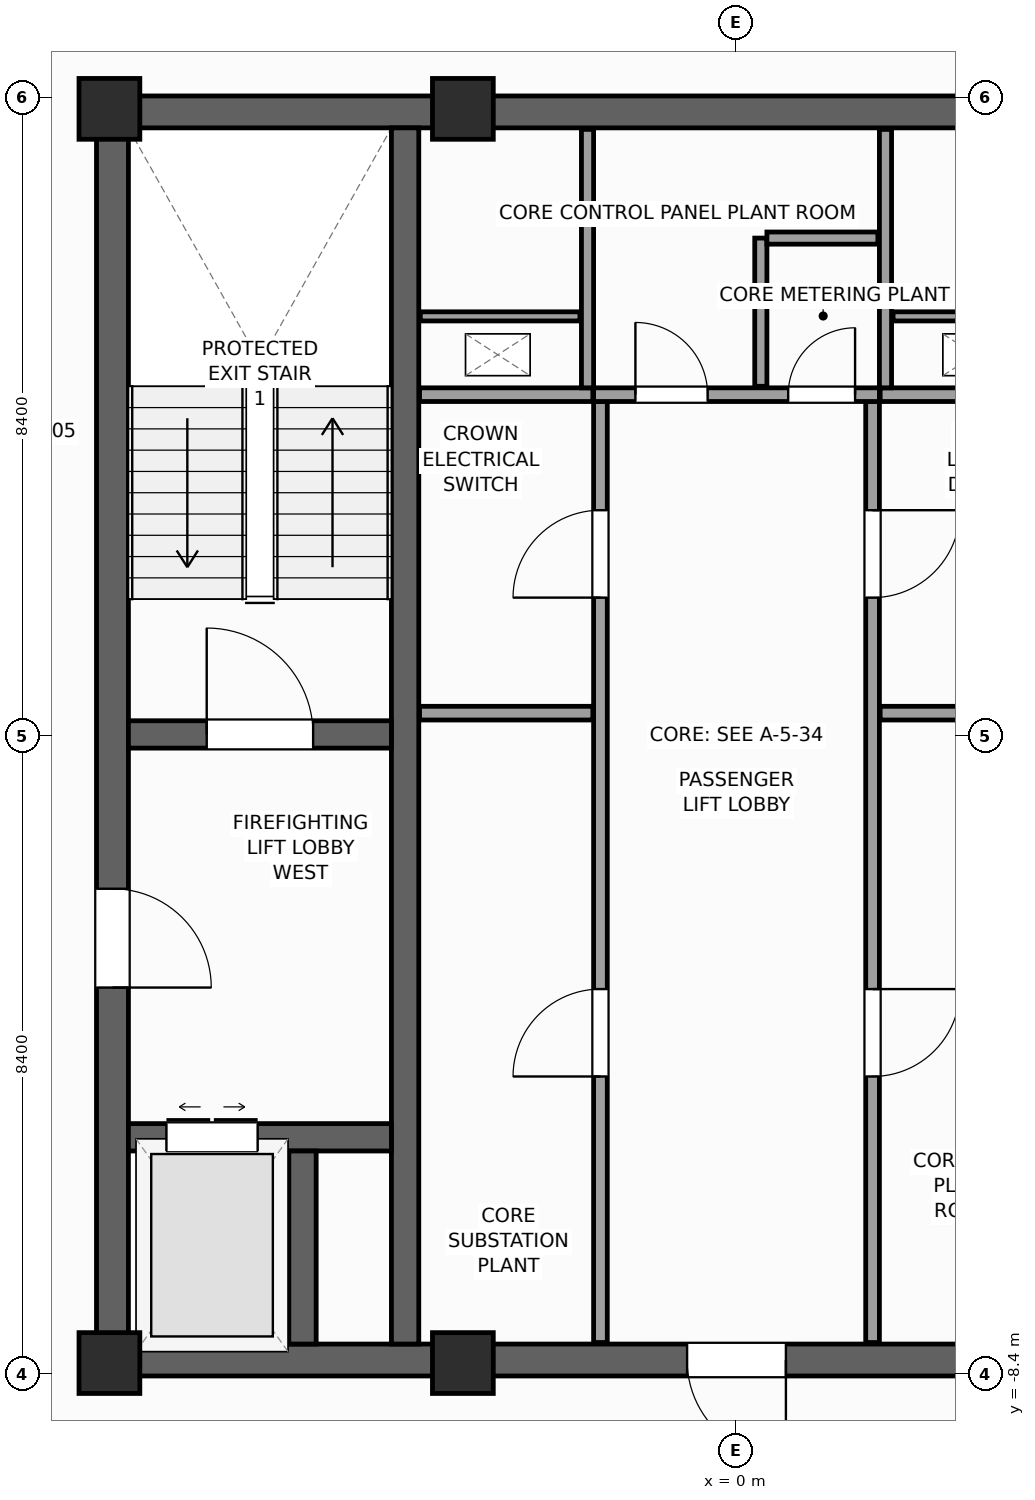
"""IFC4 building model, lengths in metres.
Left out: names, types, materials, properties, quantities, classifications, styles, units other than length and angle.
Written with IfcOpenShell. Run it as: python <this file> out.ifc"""

import sys

from ifc_helpers import new_model, si_unit, direction, frame, frame_2d, origin, origin_2d, place, context, subcontext, project, spatial, rectangle, extrude, source, transform, mapped, element, fill, save


model = new_model("IFC4")
c1 = context("Model", 3, precision=1e-05, world=origin(), true_north=direction((0.0, 1.0)))
c2 = subcontext(c1, "Body", "Model", "MODEL_VIEW")
j1 = project(units=[si_unit("LENGTHUNIT", "METRE"), si_unit("PLANEANGLEUNIT", "RADIAN")], contexts=[c1])
p1 = place(None, origin())
s1 = spatial("IfcSite", under=j1, at=p1, CompositionType="ELEMENT")
p2 = place(p1, origin())
s2 = spatial("IfcBuilding", under=s1, at=p2, CompositionType="ELEMENT")
p3 = place(p2, frame((0.0, 0.0, 329.6)))
s3 = spatial("IfcBuildingStorey", under=s2, at=p3, CompositionType="ELEMENT", Elevation=329.6)
p4 = place(p3, frame((-8.42, -8.21, 0.0), z_axis=(0.0, 0.0, 1.0), x_axis=(1.0, 0.0, 0.0)))
e1 = element("IfcWall", 1, at=p4, inside=s3, PredefinedType="SHEAR", context=c2, shape_type="SweptSolid", body=[
    extrude(rectangle(XDim=16.84, YDim=0.42, at=frame_2d((8.42, 0.0))), origin(), (0.0, 0.0, 1.0), 4.0),
])
p5 = place(p4, frame((7.77, 0.0, 0.0)))
e2 = element("IfcOpeningElement", 2, at=p5, cuts=e1, PredefinedType="OPENING", context=c2, shape_type="SweptSolid", body=[
    extrude(rectangle(XDim=1.3, YDim=2.2, at=frame_2d((0.65, 1.1))), frame((0.0, 0.22, 0.0), z_axis=(0.0, -1.0, 0.0), x_axis=(1.0, 0.0, 0.0)), (0.0, 0.0, 1.0), 0.44),
])
p6 = place(p3, frame((-8.42, 8.21, 0.0), z_axis=(0.0, 0.0, 1.0), x_axis=(1.0, 0.0, 0.0)))
e3 = element("IfcWall", 3, at=p6, inside=s3, PredefinedType="SHEAR", context=c2, shape_type="SweptSolid", body=[
    extrude(rectangle(XDim=16.84, YDim=0.42, at=frame_2d((8.42, 0.0))), origin(), (0.0, 0.0, 1.0), 4.0),
])
p7 = place(p3, frame((-8.21, -8.0, 0.0), z_axis=(0.0, 0.0, 1.0), x_axis=(0.0, 1.0, 0.0)))
e4 = element("IfcWall", 4, at=p7, inside=s3, PredefinedType="SHEAR", context=c2, shape_type="SweptSolid", body=[
    extrude(rectangle(XDim=16.0, YDim=0.42, at=frame_2d((8.0, 0.0))), origin(), (0.0, 0.0, 1.0), 4.0),
])
p8 = place(p7, frame((4.69, 0.0, 0.0)))
e5 = element("IfcOpeningElement", 5, at=p8, cuts=e4, PredefinedType="OPENING", context=c2, shape_type="SweptSolid", body=[
    extrude(rectangle(XDim=1.3, YDim=2.2, at=frame_2d((0.65, 1.1))), frame((0.0, 0.22, 0.0), z_axis=(0.0, -1.0, 0.0), x_axis=(1.0, 0.0, 0.0)), (0.0, 0.0, 1.0), 0.44),
])
p9 = place(p3, frame((-4.36, -8.0, 0.0), z_axis=(0.0, 0.0, 1.0), x_axis=(0.0, 1.0, 0.0)))
e6 = element("IfcWall", 6, at=p9, inside=s3, PredefinedType="SHEAR", context=c2, shape_type="SweptSolid", body=[
    extrude(rectangle(XDim=16.0, YDim=0.36, at=frame_2d((8.0, 0.0))), origin(), (0.0, 0.0, 1.0), 4.0),
])
p10 = place(p3, frame((-8.0, 0.02, 0.0), z_axis=(0.0, 0.0, 1.0), x_axis=(1.0, 0.0, 0.0)))
e7 = element("IfcWall", 7, at=p10, inside=s3, PredefinedType="SHEAR", context=c2, shape_type="SweptSolid", body=[
    extrude(rectangle(XDim=3.46, YDim=0.36, at=frame_2d((1.73, 0.0))), origin(), (0.0, 0.0, 1.0), 4.0),
])
p11 = place(p10, frame((1.03, 0.0, 0.0)))
e8 = element("IfcOpeningElement", 8, at=p11, cuts=e7, PredefinedType="OPENING", context=c2, shape_type="SweptSolid", body=[
    extrude(rectangle(XDim=1.4, YDim=2.2, at=frame_2d((0.7, 1.1))), frame((0.0, 0.19, 0.0), z_axis=(0.0, -1.0, 0.0), x_axis=(1.0, 0.0, 0.0)), (0.0, 0.0, 1.0), 0.38),
])
p12 = place(p3, frame((-8.0, -5.28, 0.0), z_axis=(0.0, 0.0, 1.0), x_axis=(1.0, 0.0, 0.0)))
e9 = element("IfcWall", 9, at=p12, inside=s3, PredefinedType="SHEAR", context=c2, shape_type="SweptSolid", body=[
    extrude(rectangle(XDim=3.46, YDim=0.36, at=frame_2d((1.73, 0.0))), origin(), (0.0, 0.0, 1.0), 4.0),
])
p13 = place(p12, frame((0.5, 0.0, 0.0)))
e10 = element("IfcOpeningElement", 10, at=p13, cuts=e9, PredefinedType="OPENING", context=c2, shape_type="SweptSolid", body=[
    extrude(rectangle(XDim=1.2, YDim=2.25, at=frame_2d((0.6, 1.125))), frame((0.0, 0.19, 0.0), z_axis=(0.0, -1.0, 0.0), x_axis=(1.0, 0.0, 0.0)), (0.0, 0.0, 1.0), 0.38),
])
p14 = place(p3, frame((-5.71, -8.0, 0.0), z_axis=(0.0, 0.0, 1.0), x_axis=(0.0, 1.0, 0.0)))
e11 = element("IfcWall", 11, at=p14, inside=s3, PredefinedType="SHEAR", context=c2, shape_type="SweptSolid", body=[
    extrude(rectangle(XDim=2.54, YDim=0.36, at=frame_2d((1.27, 0.0))), origin(), (0.0, 0.0, 1.0), 4.0),
])
m1 = source(origin(), c2, "Body", "SweptSolid", [
    extrude(rectangle(XDim=0.8, YDim=0.8, at=origin_2d()), origin(), (0.0, 0.0, 1.0), 4.0),
])
for number, where, z_axis, x_axis in (
    (12, (-8.25, -8.25, 0.0), (0.0, 0.0, 1.0), (1.0, 0.0, 0.0)),
    (13, (-8.25, 8.25, 0.0), (0.0, 0.0, 1.0), (1.0, 0.0, 0.0)),
    (14, (-3.6, -8.25, 0.0), (0.0, 0.0, 1.0), (1.0, 0.0, 0.0)),
    (15, (-3.6, 8.25, 0.0), (0.0, 0.0, 1.0), (1.0, 0.0, 0.0)),
):
    element("IfcColumn", number, at=place(p3, frame(where, z_axis=z_axis, x_axis=x_axis)), inside=s3, PredefinedType="PILASTER", context=c2, shape_type="MappedRepresentation", body=[
        mapped(m1, transform((0.0, 0.0, 0.0), scale=1.0)),
    ])
p15 = place(p3, frame((-1.79, -7.98, 0.0), z_axis=(0.0, 0.0, 1.0), x_axis=(0.0, 1.0, 0.0)))
e16 = element("IfcWall", 16, at=p15, inside=s3, PredefinedType="PARTITIONING", context=c2, shape_type="SweptSolid", body=[
    extrude(rectangle(XDim=12.38, YDim=0.18, at=frame_2d((6.19, 0.0))), origin(), (0.0, 0.0, 1.0), 3.7),
])
p16 = place(p15, frame((3.5, 0.0, 0.0)))
e17 = element("IfcOpeningElement", 17, at=p16, cuts=e16, PredefinedType="OPENING", context=c2, shape_type="SweptSolid", body=[
    extrude(rectangle(XDim=1.15, YDim=2.25, at=frame_2d((0.575, 1.125))), frame((0.0, 0.1, 0.0), z_axis=(0.0, -1.0, 0.0), x_axis=(1.0, 0.0, 0.0)), (0.0, 0.0, 1.0), 0.2),
])
p17 = place(p15, frame((9.8, 0.0, 0.0)))
e18 = element("IfcOpeningElement", 18, at=p17, cuts=e16, PredefinedType="OPENING", context=c2, shape_type="SweptSolid", body=[
    extrude(rectangle(XDim=1.15, YDim=2.25, at=frame_2d((0.575, 1.125))), frame((0.0, 0.1, 0.0), z_axis=(0.0, -1.0, 0.0), x_axis=(1.0, 0.0, 0.0)), (0.0, 0.0, 1.0), 0.2),
])
p18 = place(p3, frame((1.79, -7.98, 0.0), z_axis=(0.0, 0.0, 1.0), x_axis=(0.0, 1.0, 0.0)))
e19 = element("IfcWall", 19, at=p18, inside=s3, PredefinedType="PARTITIONING", context=c2, shape_type="SweptSolid", body=[
    extrude(rectangle(XDim=12.38, YDim=0.18, at=frame_2d((6.19, 0.0))), origin(), (0.0, 0.0, 1.0), 3.7),
])
p19 = place(p18, frame((3.5, 0.0, 0.0)))
e20 = element("IfcOpeningElement", 20, at=p19, cuts=e19, PredefinedType="OPENING", context=c2, shape_type="SweptSolid", body=[
    extrude(rectangle(XDim=1.15, YDim=2.25, at=frame_2d((0.575, 1.125))), frame((0.0, 0.1, 0.0), z_axis=(0.0, -1.0, 0.0), x_axis=(1.0, 0.0, 0.0)), (0.0, 0.0, 1.0), 0.2),
])
p20 = place(p18, frame((9.8, 0.0, 0.0)))
e21 = element("IfcOpeningElement", 21, at=p20, cuts=e19, PredefinedType="OPENING", context=c2, shape_type="SweptSolid", body=[
    extrude(rectangle(XDim=1.15, YDim=2.25, at=frame_2d((0.575, 1.125))), frame((0.0, 0.1, 0.0), z_axis=(0.0, -1.0, 0.0), x_axis=(1.0, 0.0, 0.0)), (0.0, 0.0, 1.0), 0.2),
])
p21 = place(p3, frame((-1.88, 4.49, 0.0), z_axis=(0.0, 0.0, 1.0), x_axis=(1.0, 0.0, 0.0)))
e22 = element("IfcWall", 22, at=p21, inside=s3, PredefinedType="PARTITIONING", context=c2, shape_type="SweptSolid", body=[
    extrude(rectangle(XDim=3.76, YDim=0.18, at=frame_2d((1.88, 0.0))), origin(), (0.0, 0.0, 1.0), 3.7),
])
p22 = place(p21, frame((0.55, 0.0, 0.0)))
e23 = element("IfcOpeningElement", 23, at=p22, cuts=e22, PredefinedType="OPENING", context=c2, shape_type="SweptSolid", body=[
    extrude(rectangle(XDim=0.95, YDim=2.1, at=frame_2d((0.475, 1.05))), frame((0.0, 0.1, 0.0), z_axis=(0.0, -1.0, 0.0), x_axis=(1.0, 0.0, 0.0)), (0.0, 0.0, 1.0), 0.2),
])
p23 = place(p21, frame((2.56, 0.0, 0.0)))
e24 = element("IfcOpeningElement", 24, at=p23, cuts=e22, PredefinedType="OPENING", context=c2, shape_type="SweptSolid", body=[
    extrude(rectangle(XDim=0.88, YDim=2.1, at=frame_2d((0.44, 1.05))), frame((0.0, 0.1, 0.0), z_axis=(0.0, -1.0, 0.0), x_axis=(1.0, 0.0, 0.0)), (0.0, 0.0, 1.0), 0.2),
])
for number, where, z_axis, x_axis in (
    (25, (-4.17, 0.3, 0.0), (0.0, 0.0, 1.0), (1.0, 0.0, 0.0)),
    (26, (1.89, 0.3, 0.0), (0.0, 0.0, 1.0), (1.0, 0.0, 0.0)),
    (27, (-4.17, 4.49, 0.0), (0.0, 0.0, 1.0), (1.0, 0.0, 0.0)),
    (28, (1.89, 4.49, 0.0), (0.0, 0.0, 1.0), (1.0, 0.0, 0.0)),
):
    element("IfcWall", number, at=place(p3, frame(where, z_axis=z_axis, x_axis=x_axis)), inside=s3, PredefinedType="PARTITIONING", context=c2, shape_type="SweptSolid", body=[
        extrude(rectangle(XDim=2.28, YDim=0.18, at=frame_2d((1.14, 0.0))), origin(), (0.0, 0.0, 1.0), 3.7),
    ])
for number, where, z_axis, x_axis in (
    (29, (-1.96, 4.58, 0.0), (0.0, 0.0, 1.0), (0.0, 1.0, 0.0)),
    (30, (1.96, 4.58, 0.0), (0.0, 0.0, 1.0), (0.0, 1.0, 0.0)),
):
    element("IfcWall", number, at=place(p3, frame(where, z_axis=z_axis, x_axis=x_axis)), inside=s3, PredefinedType="PARTITIONING", context=c2, shape_type="SweptSolid", body=[
        extrude(rectangle(XDim=3.4, YDim=0.16, at=frame_2d((1.7, 0.0))), origin(), (0.0, 0.0, 1.0), 3.7),
    ])
for number, where, z_axis, x_axis in (
    (31, (-4.16, 5.52, 0.0), (0.0, 0.0, 1.0), (1.0, 0.0, 0.0)),
    (32, (2.06, 5.52, 0.0), (0.0, 0.0, 1.0), (1.0, 0.0, 0.0)),
):
    element("IfcWall", number, at=place(p3, frame(where, z_axis=z_axis, x_axis=x_axis)), inside=s3, PredefinedType="PARTITIONING", context=c2, shape_type="SweptSolid", body=[
        extrude(rectangle(XDim=2.1, YDim=0.12, at=frame_2d((1.05, 0.0))), origin(), (0.0, 0.0, 1.0), 3.7),
    ])
p24 = place(p3, frame((0.32, 4.6, 0.0), z_axis=(0.0, 0.0, 1.0), x_axis=(0.0, 1.0, 0.0)))
e33 = element("IfcWall", 33, at=p24, inside=s3, PredefinedType="PARTITIONING", context=c2, shape_type="SweptSolid", body=[
    extrude(rectangle(XDim=1.95, YDim=0.16, at=frame_2d((0.975, 0.0))), origin(), (0.0, 0.0, 1.0), 3.7),
])
p25 = place(p3, frame((0.4, 6.55, 0.0), z_axis=(0.0, 0.0, 1.0), x_axis=(1.0, 0.0, 0.0)))
e34 = element("IfcWall", 34, at=p25, inside=s3, PredefinedType="PARTITIONING", context=c2, shape_type="SweptSolid", body=[
    extrude(rectangle(XDim=1.46, YDim=0.16, at=frame_2d((0.73, 0.0))), origin(), (0.0, 0.0, 1.0), 3.7),
])
m2 = source(origin(), c2, "Body", "SweptSolid", [
    extrude(rectangle(XDim=1.4, YDim=2.2, at=frame_2d((0.7, 1.1))), frame((0.0, 0.025, 0.0), z_axis=(0.0, -1.0, 0.0), x_axis=(1.0, 0.0, 0.0)), (0.0, 0.0, 1.0), 0.05),
])
p26 = place(p11, origin())
e35 = element("IfcDoor", 35, at=p26, inside=s3, OperationType="SINGLE_SWING_LEFT", PredefinedType="DOOR", context=c2, shape_type="MappedRepresentation", body=[
    mapped(m2, transform((0.0, 0.0, 0.0), scale=1.0)),
])
fill(e8, e35)
m3 = source(origin(), c2, "Body", "SweptSolid", [
    extrude(rectangle(XDim=1.3, YDim=2.2, at=frame_2d((0.65, 1.1))), frame((0.0, 0.025, 0.0), z_axis=(0.0, -1.0, 0.0), x_axis=(1.0, 0.0, 0.0)), (0.0, 0.0, 1.0), 0.05),
])
p27 = place(p8, frame((1.3, 0.0, 0.0), z_axis=(0.0, 0.0, 1.0), x_axis=(-1.0, 0.0, 0.0)))
e36 = element("IfcDoor", 36, at=p27, inside=s3, OperationType="SINGLE_SWING_LEFT", PredefinedType="DOOR", context=c2, shape_type="MappedRepresentation", body=[
    mapped(m3, transform((0.0, 0.0, 0.0), scale=1.0)),
])
fill(e5, e36)
p28 = place(p5, frame((1.3, 0.0, 0.0), z_axis=(0.0, 0.0, 1.0), x_axis=(-1.0, 0.0, 0.0)))
e37 = element("IfcDoor", 37, at=p28, inside=s3, OperationType="SINGLE_SWING_RIGHT", PredefinedType="DOOR", context=c2, shape_type="MappedRepresentation", body=[
    mapped(m3, transform((0.0, 0.0, 0.0), scale=1.0)),
])
fill(e2, e37)
m4 = source(origin(), c2, "Body", "SweptSolid", [
    extrude(rectangle(XDim=1.2, YDim=2.25, at=frame_2d((0.6, 1.125))), frame((0.0, 0.025, 0.0), z_axis=(0.0, -1.0, 0.0), x_axis=(1.0, 0.0, 0.0)), (0.0, 0.0, 1.0), 0.05),
])
p29 = place(p13, origin())
e38 = element("IfcDoor", 38, at=p29, inside=s3, OperationType="DOUBLE_DOOR_SLIDING", PredefinedType="DOOR", context=c2, shape_type="MappedRepresentation", body=[
    mapped(m4, transform((0.0, 0.0, 0.0), scale=1.0)),
])
fill(e10, e38)
m5 = source(origin(), c2, "Body", "SweptSolid", [
    extrude(rectangle(XDim=1.15, YDim=2.25, at=frame_2d((0.575, 1.125))), frame((0.0, 0.025, 0.0), z_axis=(0.0, -1.0, 0.0), x_axis=(1.0, 0.0, 0.0)), (0.0, 0.0, 1.0), 0.05),
])
p30 = place(p16, origin())
e39 = element("IfcDoor", 39, at=p30, inside=s3, OperationType="SINGLE_SWING_LEFT", PredefinedType="DOOR", context=c2, shape_type="MappedRepresentation", body=[
    mapped(m5, transform((0.0, 0.0, 0.0), scale=1.0)),
])
fill(e17, e39)
p31 = place(p19, frame((1.15, 0.0, 0.0), z_axis=(0.0, 0.0, 1.0), x_axis=(-1.0, 0.0, 0.0)))
e40 = element("IfcDoor", 40, at=p31, inside=s3, OperationType="SINGLE_SWING_RIGHT", PredefinedType="DOOR", context=c2, shape_type="MappedRepresentation", body=[
    mapped(m5, transform((0.0, 0.0, 0.0), scale=1.0)),
])
fill(e20, e40)
p32 = place(p17, origin())
e41 = element("IfcDoor", 41, at=p32, inside=s3, OperationType="SINGLE_SWING_LEFT", PredefinedType="DOOR", context=c2, shape_type="MappedRepresentation", body=[
    mapped(m5, transform((0.0, 0.0, 0.0), scale=1.0)),
])
fill(e18, e41)
p33 = place(p20, frame((1.15, 0.0, 0.0), z_axis=(0.0, 0.0, 1.0), x_axis=(-1.0, 0.0, 0.0)))
e42 = element("IfcDoor", 42, at=p33, inside=s3, OperationType="SINGLE_SWING_RIGHT", PredefinedType="DOOR", context=c2, shape_type="MappedRepresentation", body=[
    mapped(m5, transform((0.0, 0.0, 0.0), scale=1.0)),
])
fill(e21, e42)
m6 = source(origin(), c2, "Body", "SweptSolid", [
    extrude(rectangle(XDim=0.95, YDim=2.1, at=frame_2d((0.475, 1.05))), frame((0.0, 0.025, 0.0), z_axis=(0.0, -1.0, 0.0), x_axis=(1.0, 0.0, 0.0)), (0.0, 0.0, 1.0), 0.05),
])
p34 = place(p22, origin())
e43 = element("IfcDoor", 43, at=p34, inside=s3, OperationType="SINGLE_SWING_LEFT", PredefinedType="DOOR", context=c2, shape_type="MappedRepresentation", body=[
    mapped(m6, transform((0.0, 0.0, 0.0), scale=1.0)),
])
fill(e23, e43)
m7 = source(origin(), c2, "Body", "SweptSolid", [
    extrude(rectangle(XDim=0.88, YDim=2.1, at=frame_2d((0.44, 1.05))), frame((0.0, 0.025, 0.0), z_axis=(0.0, -1.0, 0.0), x_axis=(1.0, 0.0, 0.0)), (0.0, 0.0, 1.0), 0.05),
])
p35 = place(p23, origin())
e44 = element("IfcDoor", 44, at=p35, inside=s3, OperationType="SINGLE_SWING_RIGHT", PredefinedType="DOOR", context=c2, shape_type="MappedRepresentation", body=[
    mapped(m7, transform((0.0, 0.0, 0.0), scale=1.0)),
])
fill(e24, e44)
save(model, sys.argv[1])
